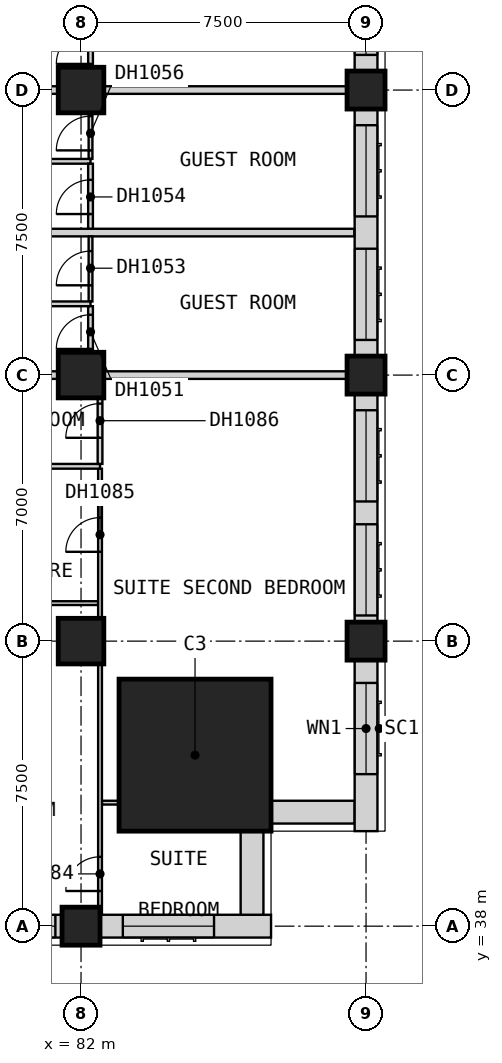
"""IFC4 building model, lengths in metres.
Left out: names, types, materials, properties, quantities, classifications, styles, units other than length and angle.
Written with IfcOpenShell. Run it as: python <this file> out.ifc"""

import sys

from ifc_helpers import new_model, si_unit, direction, frame, frame_2d, origin, origin_2d, place, context, subcontext, project, spatial, rectangle, extrude, element, fill, save


model = new_model("IFC4")
c1 = context("Model", 3, precision=1e-05, world=origin(), true_north=direction((0.0, 1.0)))
c2 = subcontext(c1, "Body", "Model", "MODEL_VIEW")
j1 = project(units=[si_unit("LENGTHUNIT", "METRE"), si_unit("PLANEANGLEUNIT", "RADIAN")], contexts=[c1])
p1 = place(None, origin())
s1 = spatial("IfcSite", under=j1, at=p1, CompositionType="ELEMENT")
p2 = place(p1, origin())
s2 = spatial("IfcBuilding", under=s1, at=p2, CompositionType="ELEMENT")
p3 = place(p2, frame((0.0, 0.0, 48.4)))
s3 = spatial("IfcBuildingStorey", under=s2, at=p3, CompositionType="ELEMENT", Elevation=48.4)
p4 = place(p3, frame((82.0, 38.0, 0.0), z_axis=(0.0, 0.0, 1.0), x_axis=(1.0, 0.0, 0.0)))
e1 = element("IfcColumn", 1, at=p4, inside=s3, PredefinedType="COLUMN", context=c2, shape_type="SweptSolid", body=[
    extrude(rectangle(XDim=1.0, YDim=1.0, at=origin_2d()), origin(), (0.0, 0.0, 1.0), 3.6),
])
for number, where, z_axis, x_axis in (
    (2, (82.0, 45.5, 0.0), (0.0, 0.0, 1.0), (1.0, 0.0, 0.0)),
    (3, (82.0, 52.5, 0.0), (0.0, 0.0, 1.0), (1.0, 0.0, 0.0)),
    (4, (82.0, 60.0, 0.0), (0.0, 0.0, 1.0), (1.0, 0.0, 0.0)),
):
    element("IfcColumn", number, at=place(p3, frame(where, z_axis=z_axis, x_axis=x_axis)), inside=s3, PredefinedType="COLUMN", context=c2, shape_type="SweptSolid", body=[
        extrude(rectangle(XDim=1.2, YDim=1.2, at=origin_2d()), origin(), (0.0, 0.0, 1.0), 3.6),
    ])
for number, where, z_axis, x_axis in (
    (5, (89.5, 45.5, 0.0), (0.0, 0.0, 1.0), (1.0, 0.0, 0.0)),
    (6, (89.5, 52.5, 0.0), (0.0, 0.0, 1.0), (1.0, 0.0, 0.0)),
    (7, (89.5, 60.0, 0.0), (0.0, 0.0, 1.0), (1.0, 0.0, 0.0)),
):
    element("IfcColumn", number, at=place(p3, frame(where, z_axis=z_axis, x_axis=x_axis)), inside=s3, PredefinedType="COLUMN", context=c2, shape_type="SweptSolid", body=[
        extrude(rectangle(XDim=1.0, YDim=1.0, at=origin_2d()), origin(), (0.0, 0.0, 1.0), 3.6),
    ])
p5 = place(p3, frame((85.0, 42.5, 0.0), z_axis=(0.0, 0.0, 1.0), x_axis=(1.0, 0.0, 0.0)))
e8 = element("IfcColumn", 8, at=p5, inside=s3, PredefinedType="COLUMN", context=c2, shape_type="SweptSolid", body=[
    extrude(rectangle(XDim=4.0, YDim=4.0, at=origin_2d()), origin(), (0.0, 0.0, 1.0), 3.6),
])
p6 = place(p3, frame((75.0, 38.0, 0.0), z_axis=(0.0, 0.0, 1.0), x_axis=(1.0, 0.0, 0.0)))
e9 = element("IfcWall", 9, at=p6, inside=s3, PredefinedType="SOLIDWALL", context=c2, shape_type="SweptSolid", body=[
    extrude(rectangle(XDim=6.5, YDim=0.6, at=frame_2d((3.25, 0.0))), origin(), (0.0, 0.0, 1.0), 2.85),
])
p7 = place(p6, frame((0.675, 0.0, 0.8)))
e10 = element("IfcOpeningElement", 10, at=p7, cuts=e9, PredefinedType="OPENING", context=c2, shape_type="SweptSolid", body=[
    extrude(rectangle(XDim=2.4, YDim=1.8, at=frame_2d((1.2, 0.9))), frame((0.0, 0.31, 0.0), z_axis=(0.0, -1.0, 0.0), x_axis=(1.0, 0.0, 0.0)), (0.0, 0.0, 1.0), 0.62),
])
p8 = place(p6, frame((3.925, 0.0, 0.8)))
e11 = element("IfcOpeningElement", 11, at=p8, cuts=e9, PredefinedType="OPENING", context=c2, shape_type="SweptSolid", body=[
    extrude(rectangle(XDim=2.4, YDim=1.8, at=frame_2d((1.2, 0.9))), frame((0.0, 0.31, 0.0), z_axis=(0.0, -1.0, 0.0), x_axis=(1.0, 0.0, 0.0)), (0.0, 0.0, 1.0), 0.62),
])
p9 = place(p3, frame((82.5, 38.0, 0.0), z_axis=(0.0, 0.0, 1.0), x_axis=(1.0, 0.0, 0.0)))
e12 = element("IfcWall", 12, at=p9, inside=s3, PredefinedType="SOLIDWALL", context=c2, shape_type="SweptSolid", body=[
    extrude(rectangle(XDim=4.5, YDim=0.6, at=frame_2d((2.25, 0.0))), origin(), (0.0, 0.0, 1.0), 3.35),
])
p10 = place(p9, frame((0.6, 0.0, 0.8)))
e13 = element("IfcOpeningElement", 13, at=p10, cuts=e12, PredefinedType="OPENING", context=c2, shape_type="SweptSolid", body=[
    extrude(rectangle(XDim=2.4, YDim=1.8, at=frame_2d((1.2, 0.9))), frame((0.0, 0.31, 0.0), z_axis=(0.0, -1.0, 0.0), x_axis=(1.0, 0.0, 0.0)), (0.0, 0.0, 1.0), 0.62),
])
for number, where, z_axis, x_axis in (
    (14, (86.5, 38.3, 0.0), (0.0, 0.0, 1.0), (0.0, 1.0, 0.0)),
    (15, (87.0, 41.0, 0.0), (0.0, 0.0, 1.0), (1.0, 0.0, 0.0)),
):
    element("IfcWall", number, at=place(p3, frame(where, z_axis=z_axis, x_axis=x_axis)), inside=s3, PredefinedType="SOLIDWALL", context=c2, shape_type="SweptSolid", body=[
        extrude(rectangle(XDim=2.2, YDim=0.6, at=frame_2d((1.1, 0.0))), origin(), (0.0, 0.0, 1.0), 3.35),
    ])
p11 = place(p3, frame((89.5, 40.5, 0.0), z_axis=(0.0, 0.0, 1.0), x_axis=(0.0, 1.0, 0.0)))
e16 = element("IfcWall", 16, at=p11, inside=s3, PredefinedType="SOLIDWALL", context=c2, shape_type="SweptSolid", body=[
    extrude(rectangle(XDim=4.5, YDim=0.6, at=frame_2d((2.25, 0.0))), origin(), (0.0, 0.0, 1.0), 3.35),
])
p12 = place(p11, frame((1.5, 0.0, 0.8)))
e17 = element("IfcOpeningElement", 17, at=p12, cuts=e16, PredefinedType="OPENING", context=c2, shape_type="SweptSolid", body=[
    extrude(rectangle(XDim=2.4, YDim=1.8, at=frame_2d((1.2, 0.9))), frame((0.0, 0.31, 0.0), z_axis=(0.0, -1.0, 0.0), x_axis=(1.0, 0.0, 0.0)), (0.0, 0.0, 1.0), 0.62),
])
p13 = place(p3, frame((89.5, 46.0, 0.0), z_axis=(0.0, 0.0, 1.0), x_axis=(0.0, 1.0, 0.0)))
e18 = element("IfcWall", 18, at=p13, inside=s3, PredefinedType="SOLIDWALL", context=c2, shape_type="SweptSolid", body=[
    extrude(rectangle(XDim=6.0, YDim=0.6, at=frame_2d((3.0, 0.0))), origin(), (0.0, 0.0, 1.0), 2.85),
])
p14 = place(p13, frame((0.175, 0.0, 0.8)))
e19 = element("IfcOpeningElement", 19, at=p14, cuts=e18, PredefinedType="OPENING", context=c2, shape_type="SweptSolid", body=[
    extrude(rectangle(XDim=2.4, YDim=1.8, at=frame_2d((1.2, 0.9))), frame((0.0, 0.31, 0.0), z_axis=(0.0, -1.0, 0.0), x_axis=(1.0, 0.0, 0.0)), (0.0, 0.0, 1.0), 0.62),
])
p15 = place(p13, frame((3.175, 0.0, 0.8)))
e20 = element("IfcOpeningElement", 20, at=p15, cuts=e18, PredefinedType="OPENING", context=c2, shape_type="SweptSolid", body=[
    extrude(rectangle(XDim=2.4, YDim=1.8, at=frame_2d((1.2, 0.9))), frame((0.0, 0.31, 0.0), z_axis=(0.0, -1.0, 0.0), x_axis=(1.0, 0.0, 0.0)), (0.0, 0.0, 1.0), 0.62),
])
p16 = place(p3, frame((89.5, 53.0, 0.0), z_axis=(0.0, 0.0, 1.0), x_axis=(0.0, 1.0, 0.0)))
e21 = element("IfcWall", 21, at=p16, inside=s3, PredefinedType="SOLIDWALL", context=c2, shape_type="SweptSolid", body=[
    extrude(rectangle(XDim=6.5, YDim=0.6, at=frame_2d((3.25, 0.0))), origin(), (0.0, 0.0, 1.0), 2.85),
])
p17 = place(p16, frame((0.425, 0.0, 0.8)))
e22 = element("IfcOpeningElement", 22, at=p17, cuts=e21, PredefinedType="OPENING", context=c2, shape_type="SweptSolid", body=[
    extrude(rectangle(XDim=2.4, YDim=1.8, at=frame_2d((1.2, 0.9))), frame((0.0, 0.31, 0.0), z_axis=(0.0, -1.0, 0.0), x_axis=(1.0, 0.0, 0.0)), (0.0, 0.0, 1.0), 0.62),
])
p18 = place(p16, frame((3.675, 0.0, 0.8)))
e23 = element("IfcOpeningElement", 23, at=p18, cuts=e21, PredefinedType="OPENING", context=c2, shape_type="SweptSolid", body=[
    extrude(rectangle(XDim=2.4, YDim=1.8, at=frame_2d((1.2, 0.9))), frame((0.0, 0.31, 0.0), z_axis=(0.0, -1.0, 0.0), x_axis=(1.0, 0.0, 0.0)), (0.0, 0.0, 1.0), 0.62),
])
p19 = place(p3, frame((89.5, 60.5, 0.0), z_axis=(0.0, 0.0, 1.0), x_axis=(0.0, 1.0, 0.0)))
e24 = element("IfcWall", 24, at=p19, inside=s3, PredefinedType="SOLIDWALL", context=c2, shape_type="SweptSolid", body=[
    extrude(rectangle(XDim=6.5, YDim=0.6, at=frame_2d((3.25, 0.0))), origin(), (0.0, 0.0, 1.0), 2.85),
])
p20 = place(p19, frame((0.425, 0.0, 0.8)))
e25 = element("IfcOpeningElement", 25, at=p20, cuts=e24, PredefinedType="OPENING", context=c2, shape_type="SweptSolid", body=[
    extrude(rectangle(XDim=2.4, YDim=1.8, at=frame_2d((1.2, 0.9))), frame((0.0, 0.31, 0.0), z_axis=(0.0, -1.0, 0.0), x_axis=(1.0, 0.0, 0.0)), (0.0, 0.0, 1.0), 0.62),
])
p21 = place(p19, frame((3.675, 0.0, 0.8)))
e26 = element("IfcOpeningElement", 26, at=p21, cuts=e24, PredefinedType="OPENING", context=c2, shape_type="SweptSolid", body=[
    extrude(rectangle(XDim=2.4, YDim=1.8, at=frame_2d((1.2, 0.9))), frame((0.0, 0.31, 0.0), z_axis=(0.0, -1.0, 0.0), x_axis=(1.0, 0.0, 0.0)), (0.0, 0.0, 1.0), 0.62),
])
p22 = place(p3, frame((77.475, 52.5, 0.0), z_axis=(0.0, 0.0, 1.0), x_axis=(1.0, 0.0, 0.0)))
e27 = element("IfcWall", 27, at=p22, inside=s3, PredefinedType="PARTITIONING", context=c2, shape_type="SweptSolid", body=[
    extrude(rectangle(XDim=12.525, YDim=0.2, at=frame_2d((6.262, 0.0))), origin(), (0.0, 0.0, 1.0), 3.35),
])
p23 = place(p3, frame((77.475, 56.25, 0.0), z_axis=(0.0, 0.0, 1.0), x_axis=(1.0, 0.0, 0.0)))
e28 = element("IfcWall", 28, at=p23, inside=s3, PredefinedType="PARTITIONING", context=c2, shape_type="SweptSolid", body=[
    extrude(rectangle(XDim=11.715, YDim=0.2, at=frame_2d((5.857, 0.0))), origin(), (0.0, 0.0, 1.0), 3.35),
])
p24 = place(p3, frame((77.475, 60.0, 0.0), z_axis=(0.0, 0.0, 1.0), x_axis=(1.0, 0.0, 0.0)))
e29 = element("IfcWall", 29, at=p24, inside=s3, PredefinedType="PARTITIONING", context=c2, shape_type="SweptSolid", body=[
    extrude(rectangle(XDim=12.525, YDim=0.2, at=frame_2d((6.262, 0.0))), origin(), (0.0, 0.0, 1.0), 3.35),
])
p25 = place(p3, frame((82.55, 41.25, 0.0), z_axis=(0.0, 0.0, 1.0), x_axis=(1.0, 0.0, 0.0)))
e30 = element("IfcWall", 30, at=p25, inside=s3, PredefinedType="PARTITIONING", context=c2, shape_type="SweptSolid", body=[
    extrude(rectangle(XDim=4.44, YDim=0.1, at=frame_2d((2.22, 0.0))), origin(), (0.0, 0.0, 1.0), 3.35),
])
p26 = place(p3, frame((75.1, 46.5, 0.0), z_axis=(0.0, 0.0, 1.0), x_axis=(1.0, 0.0, 0.0)))
e31 = element("IfcWall", 31, at=p26, inside=s3, PredefinedType="PARTITIONING", context=c2, shape_type="SweptSolid", body=[
    extrude(rectangle(XDim=7.35, YDim=0.1, at=frame_2d((3.675, 0.0))), origin(), (0.0, 0.0, 1.0), 3.35),
])
p27 = place(p26, frame((0.65, 0.0, 0.0)))
e32 = element("IfcOpeningElement", 32, at=p27, cuts=e31, PredefinedType="OPENING", context=c2, shape_type="SweptSolid", body=[
    extrude(rectangle(XDim=0.9, YDim=2.1, at=frame_2d((0.45, 1.05))), frame((0.0, 0.06, 0.0), z_axis=(0.0, -1.0, 0.0), x_axis=(1.0, 0.0, 0.0)), (0.0, 0.0, 1.0), 0.12),
])
p28 = place(p3, frame((82.25, 54.438, 0.0), z_axis=(0.0, 0.0, 1.0), x_axis=(0.0, 1.0, 0.0)))
e33 = element("IfcWall", 33, at=p28, inside=s3, PredefinedType="PARTITIONING", context=c2, shape_type="SweptSolid", body=[
    extrude(rectangle(XDim=1.712, YDim=0.1, at=frame_2d((0.856, 0.0))), origin(), (0.0, 0.0, 1.0), 3.35),
])
p29 = place(p28, frame((0.425, 0.0, 0.0)))
e34 = element("IfcOpeningElement", 34, at=p29, cuts=e33, PredefinedType="OPENING", context=c2, shape_type="SweptSolid", body=[
    extrude(rectangle(XDim=0.9, YDim=2.1, at=frame_2d((0.45, 1.05))), frame((0.0, 0.06, 0.0), z_axis=(0.0, -1.0, 0.0), x_axis=(1.0, 0.0, 0.0)), (0.0, 0.0, 1.0), 0.12),
])
p30 = place(p3, frame((82.25, 58.188, 0.0), z_axis=(0.0, 0.0, 1.0), x_axis=(0.0, 1.0, 0.0)))
e35 = element("IfcWall", 35, at=p30, inside=s3, PredefinedType="PARTITIONING", context=c2, shape_type="SweptSolid", body=[
    extrude(rectangle(XDim=1.712, YDim=0.1, at=frame_2d((0.856, 0.0))), origin(), (0.0, 0.0, 1.0), 3.35),
])
p31 = place(p30, frame((0.225, 0.0, 0.0)))
e36 = element("IfcOpeningElement", 36, at=p31, cuts=e35, PredefinedType="OPENING", context=c2, shape_type="SweptSolid", body=[
    extrude(rectangle(XDim=0.9, YDim=2.1, at=frame_2d((0.45, 1.05))), frame((0.0, 0.06, 0.0), z_axis=(0.0, -1.0, 0.0), x_axis=(1.0, 0.0, 0.0)), (0.0, 0.0, 1.0), 0.12),
])
p32 = place(p3, frame((82.5, 38.31, 0.0), z_axis=(0.0, 0.0, 1.0), x_axis=(0.0, 1.0, 0.0)))
e37 = element("IfcWall", 37, at=p32, inside=s3, PredefinedType="PARTITIONING", context=c2, shape_type="SweptSolid", body=[
    extrude(rectangle(XDim=11.728, YDim=0.1, at=frame_2d((5.864, 0.0))), origin(), (0.0, 0.0, 1.0), 3.35),
])
p33 = place(p32, frame((0.615, 0.0, 0.0)))
e38 = element("IfcOpeningElement", 38, at=p33, cuts=e37, PredefinedType="OPENING", context=c2, shape_type="SweptSolid", body=[
    extrude(rectangle(XDim=0.9, YDim=2.1, at=frame_2d((0.45, 1.05))), frame((0.0, 0.06, 0.0), z_axis=(0.0, -1.0, 0.0), x_axis=(1.0, 0.0, 0.0)), (0.0, 0.0, 1.0), 0.12),
])
p34 = place(p32, frame((9.54, 0.0, 0.0)))
e39 = element("IfcOpeningElement", 39, at=p34, cuts=e37, PredefinedType="OPENING", context=c2, shape_type="SweptSolid", body=[
    extrude(rectangle(XDim=0.9, YDim=2.1, at=frame_2d((0.45, 1.05))), frame((0.0, 0.06, 0.0), z_axis=(0.0, -1.0, 0.0), x_axis=(1.0, 0.0, 0.0)), (0.0, 0.0, 1.0), 0.12),
])
p35 = place(p3, frame((77.475, 50.1, 0.0), z_axis=(0.0, 0.0, 1.0), x_axis=(1.0, 0.0, 0.0)))
e40 = element("IfcWall", 40, at=p35, inside=s3, PredefinedType="PARTITIONING", context=c2, shape_type="SweptSolid", body=[
    extrude(rectangle(XDim=5.025, YDim=0.125, at=frame_2d((2.512, 0.0))), origin(), (0.0, 0.0, 1.0), 3.35),
])
for number, where, z_axis, x_axis in (
    (41, (77.475, 54.375, 0.0), (0.0, 0.0, 1.0), (1.0, 0.0, 0.0)),
    (42, (77.475, 58.125, 0.0), (0.0, 0.0, 1.0), (1.0, 0.0, 0.0)),
):
    element("IfcWall", number, at=place(p3, frame(where, z_axis=z_axis, x_axis=x_axis)), inside=s3, PredefinedType="PARTITIONING", context=c2, shape_type="SweptSolid", body=[
        extrude(rectangle(XDim=4.775, YDim=0.125, at=frame_2d((2.387, 0.0))), origin(), (0.0, 0.0, 1.0), 3.35),
    ])
p36 = place(p3, frame((82.25, 52.6, 0.0), z_axis=(0.0, 0.0, 1.0), x_axis=(0.0, 1.0, 0.0)))
e43 = element("IfcWall", 43, at=p36, inside=s3, PredefinedType="PARTITIONING", context=c2, shape_type="SweptSolid", body=[
    extrude(rectangle(XDim=1.712, YDim=0.125, at=frame_2d((0.856, 0.0))), origin(), (0.0, 0.0, 1.0), 3.35),
])
p37 = place(p36, frame((0.587, 0.0, 0.0)))
e44 = element("IfcOpeningElement", 44, at=p37, cuts=e43, PredefinedType="OPENING", context=c2, shape_type="SweptSolid", body=[
    extrude(rectangle(XDim=0.9, YDim=2.1, at=frame_2d((0.45, 1.05))), frame((0.0, 0.073, 0.0), z_axis=(0.0, -1.0, 0.0), x_axis=(1.0, 0.0, 0.0)), (0.0, 0.0, 1.0), 0.145),
])
p38 = place(p3, frame((82.25, 56.35, 0.0), z_axis=(0.0, 0.0, 1.0), x_axis=(0.0, 1.0, 0.0)))
e45 = element("IfcWall", 45, at=p38, inside=s3, PredefinedType="PARTITIONING", context=c2, shape_type="SweptSolid", body=[
    extrude(rectangle(XDim=1.712, YDim=0.125, at=frame_2d((0.856, 0.0))), origin(), (0.0, 0.0, 1.0), 3.35),
])
p39 = place(p38, frame((0.387, 0.0, 0.0)))
e46 = element("IfcOpeningElement", 46, at=p39, cuts=e45, PredefinedType="OPENING", context=c2, shape_type="SweptSolid", body=[
    extrude(rectangle(XDim=0.9, YDim=2.1, at=frame_2d((0.45, 1.05))), frame((0.0, 0.073, 0.0), z_axis=(0.0, -1.0, 0.0), x_axis=(1.0, 0.0, 0.0)), (0.0, 0.0, 1.0), 0.145),
])
p40 = place(p3, frame((82.25, 60.1, 0.0), z_axis=(0.0, 0.0, 1.0), x_axis=(0.0, 1.0, 0.0)))
e47 = element("IfcWall", 47, at=p40, inside=s3, PredefinedType="PARTITIONING", context=c2, shape_type="SweptSolid", body=[
    extrude(rectangle(XDim=1.712, YDim=0.125, at=frame_2d((0.856, 0.0))), origin(), (0.0, 0.0, 1.0), 3.35),
])
p41 = place(p40, frame((0.587, 0.0, 0.0)))
e48 = element("IfcOpeningElement", 48, at=p41, cuts=e47, PredefinedType="OPENING", context=c2, shape_type="SweptSolid", body=[
    extrude(rectangle(XDim=0.9, YDim=2.1, at=frame_2d((0.45, 1.05))), frame((0.0, 0.073, 0.0), z_axis=(0.0, -1.0, 0.0), x_axis=(1.0, 0.0, 0.0)), (0.0, 0.0, 1.0), 0.145),
])
p42 = place(p3, frame((82.5, 50.163, 0.0), z_axis=(0.0, 0.0, 1.0), x_axis=(0.0, 1.0, 0.0)))
e49 = element("IfcWall", 49, at=p42, inside=s3, PredefinedType="PARTITIONING", context=c2, shape_type="SweptSolid", body=[
    extrude(rectangle(XDim=2.237, YDim=0.125, at=frame_2d((1.119, 0.0))), origin(), (0.0, 0.0, 1.0), 3.35),
])
p43 = place(p42, frame((0.688, 0.0, 0.0)))
e50 = element("IfcOpeningElement", 50, at=p43, cuts=e49, PredefinedType="OPENING", context=c2, shape_type="SweptSolid", body=[
    extrude(rectangle(XDim=0.9, YDim=2.1, at=frame_2d((0.45, 1.05))), frame((0.0, 0.073, 0.0), z_axis=(0.0, -1.0, 0.0), x_axis=(1.0, 0.0, 0.0)), (0.0, 0.0, 1.0), 0.145),
])
p44 = place(p8, origin())
e51 = element("IfcWindow", 51, at=p44, inside=s3, PartitioningType="SINGLE_PANEL", PredefinedType="WINDOW", context=c2, shape_type="SweptSolid", body=[
    extrude(rectangle(XDim=2.4, YDim=1.8, at=frame_2d((1.2, 0.9))), frame((0.0, -0.07, 0.0), z_axis=(0.0, -1.0, 0.0), x_axis=(1.0, 0.0, 0.0)), (0.0, 0.0, 1.0), 0.06),
])
fill(e11, e51)
p45 = place(p10, origin())
e52 = element("IfcWindow", 52, at=p45, inside=s3, PartitioningType="SINGLE_PANEL", PredefinedType="WINDOW", context=c2, shape_type="SweptSolid", body=[
    extrude(rectangle(XDim=2.4, YDim=1.8, at=frame_2d((1.2, 0.9))), frame((0.0, -0.07, 0.0), z_axis=(0.0, -1.0, 0.0), x_axis=(1.0, 0.0, 0.0)), (0.0, 0.0, 1.0), 0.06),
])
fill(e13, e52)
p46 = place(p12, origin())
e53 = element("IfcWindow", 53, at=p46, inside=s3, PartitioningType="SINGLE_PANEL", PredefinedType="WINDOW", context=c2, shape_type="SweptSolid", body=[
    extrude(rectangle(XDim=2.4, YDim=1.8, at=frame_2d((1.2, 0.9))), frame((0.0, -0.07, 0.0), z_axis=(0.0, -1.0, 0.0), x_axis=(1.0, 0.0, 0.0)), (0.0, 0.0, 1.0), 0.06),
])
fill(e17, e53)
p47 = place(p14, origin())
e54 = element("IfcWindow", 54, at=p47, inside=s3, PartitioningType="SINGLE_PANEL", PredefinedType="WINDOW", context=c2, shape_type="SweptSolid", body=[
    extrude(rectangle(XDim=2.4, YDim=1.8, at=frame_2d((1.2, 0.9))), frame((0.0, -0.07, 0.0), z_axis=(0.0, -1.0, 0.0), x_axis=(1.0, 0.0, 0.0)), (0.0, 0.0, 1.0), 0.06),
])
fill(e19, e54)
p48 = place(p15, origin())
e55 = element("IfcWindow", 55, at=p48, inside=s3, PartitioningType="SINGLE_PANEL", PredefinedType="WINDOW", context=c2, shape_type="SweptSolid", body=[
    extrude(rectangle(XDim=2.4, YDim=1.8, at=frame_2d((1.2, 0.9))), frame((0.0, -0.07, 0.0), z_axis=(0.0, -1.0, 0.0), x_axis=(1.0, 0.0, 0.0)), (0.0, 0.0, 1.0), 0.06),
])
fill(e20, e55)
p49 = place(p17, origin())
e56 = element("IfcWindow", 56, at=p49, inside=s3, PartitioningType="SINGLE_PANEL", PredefinedType="WINDOW", context=c2, shape_type="SweptSolid", body=[
    extrude(rectangle(XDim=2.4, YDim=1.8, at=frame_2d((1.2, 0.9))), frame((0.0, -0.07, 0.0), z_axis=(0.0, -1.0, 0.0), x_axis=(1.0, 0.0, 0.0)), (0.0, 0.0, 1.0), 0.06),
])
fill(e22, e56)
p50 = place(p18, origin())
e57 = element("IfcWindow", 57, at=p50, inside=s3, PartitioningType="SINGLE_PANEL", PredefinedType="WINDOW", context=c2, shape_type="SweptSolid", body=[
    extrude(rectangle(XDim=2.4, YDim=1.8, at=frame_2d((1.2, 0.9))), frame((0.0, -0.07, 0.0), z_axis=(0.0, -1.0, 0.0), x_axis=(1.0, 0.0, 0.0)), (0.0, 0.0, 1.0), 0.06),
])
fill(e23, e57)
p51 = place(p20, origin())
e58 = element("IfcWindow", 58, at=p51, inside=s3, PartitioningType="SINGLE_PANEL", PredefinedType="WINDOW", context=c2, shape_type="SweptSolid", body=[
    extrude(rectangle(XDim=2.4, YDim=1.8, at=frame_2d((1.2, 0.9))), frame((0.0, -0.07, 0.0), z_axis=(0.0, -1.0, 0.0), x_axis=(1.0, 0.0, 0.0)), (0.0, 0.0, 1.0), 0.06),
])
fill(e25, e58)
p52 = place(p37, origin())
e59 = element("IfcDoor", 59, at=p52, inside=s3, OperationType="SINGLE_SWING_RIGHT", PredefinedType="DOOR", context=c2, shape_type="SweptSolid", body=[
    extrude(rectangle(XDim=0.9, YDim=2.1, at=frame_2d((0.45, 1.05))), frame((0.0, 0.025, 0.0), z_axis=(0.0, -1.0, 0.0), x_axis=(1.0, 0.0, 0.0)), (0.0, 0.0, 1.0), 0.05),
])
fill(e44, e59)
p53 = place(p29, origin())
e60 = element("IfcDoor", 60, at=p53, inside=s3, OperationType="SINGLE_SWING_LEFT", PredefinedType="DOOR", context=c2, shape_type="SweptSolid", body=[
    extrude(rectangle(XDim=0.9, YDim=2.1, at=frame_2d((0.45, 1.05))), frame((0.0, 0.025, 0.0), z_axis=(0.0, -1.0, 0.0), x_axis=(1.0, 0.0, 0.0)), (0.0, 0.0, 1.0), 0.05),
])
fill(e34, e60)
p54 = place(p39, origin())
e61 = element("IfcDoor", 61, at=p54, inside=s3, OperationType="SINGLE_SWING_LEFT", PredefinedType="DOOR", context=c2, shape_type="SweptSolid", body=[
    extrude(rectangle(XDim=0.9, YDim=2.1, at=frame_2d((0.45, 1.05))), frame((0.0, 0.025, 0.0), z_axis=(0.0, -1.0, 0.0), x_axis=(1.0, 0.0, 0.0)), (0.0, 0.0, 1.0), 0.05),
])
fill(e46, e61)
p55 = place(p31, origin())
e62 = element("IfcDoor", 62, at=p55, inside=s3, OperationType="SINGLE_SWING_LEFT", PredefinedType="DOOR", context=c2, shape_type="SweptSolid", body=[
    extrude(rectangle(XDim=0.9, YDim=2.1, at=frame_2d((0.45, 1.05))), frame((0.0, 0.025, 0.0), z_axis=(0.0, -1.0, 0.0), x_axis=(1.0, 0.0, 0.0)), (0.0, 0.0, 1.0), 0.05),
])
fill(e36, e62)
p56 = place(p41, origin())
e63 = element("IfcDoor", 63, at=p56, inside=s3, OperationType="SINGLE_SWING_RIGHT", PredefinedType="DOOR", context=c2, shape_type="SweptSolid", body=[
    extrude(rectangle(XDim=0.9, YDim=2.1, at=frame_2d((0.45, 1.05))), frame((0.0, 0.025, 0.0), z_axis=(0.0, -1.0, 0.0), x_axis=(1.0, 0.0, 0.0)), (0.0, 0.0, 1.0), 0.05),
])
fill(e48, e63)
p57 = place(p33, origin())
e64 = element("IfcDoor", 64, at=p57, inside=s3, OperationType="SINGLE_SWING_LEFT", PredefinedType="DOOR", context=c2, shape_type="SweptSolid", body=[
    extrude(rectangle(XDim=0.9, YDim=2.1, at=frame_2d((0.45, 1.05))), frame((0.0, 0.025, 0.0), z_axis=(0.0, -1.0, 0.0), x_axis=(1.0, 0.0, 0.0)), (0.0, 0.0, 1.0), 0.05),
])
fill(e38, e64)
p58 = place(p34, origin())
e65 = element("IfcDoor", 65, at=p58, inside=s3, OperationType="SINGLE_SWING_RIGHT", PredefinedType="DOOR", context=c2, shape_type="SweptSolid", body=[
    extrude(rectangle(XDim=0.9, YDim=2.1, at=frame_2d((0.45, 1.05))), frame((0.0, 0.025, 0.0), z_axis=(0.0, -1.0, 0.0), x_axis=(1.0, 0.0, 0.0)), (0.0, 0.0, 1.0), 0.05),
])
fill(e39, e65)
p59 = place(p43, origin())
e66 = element("IfcDoor", 66, at=p59, inside=s3, OperationType="SINGLE_SWING_LEFT", PredefinedType="DOOR", context=c2, shape_type="SweptSolid", body=[
    extrude(rectangle(XDim=0.9, YDim=2.1, at=frame_2d((0.45, 1.05))), frame((0.0, 0.025, 0.0), z_axis=(0.0, -1.0, 0.0), x_axis=(1.0, 0.0, 0.0)), (0.0, 0.0, 1.0), 0.05),
])
fill(e50, e66)
save(model, sys.argv[1])
